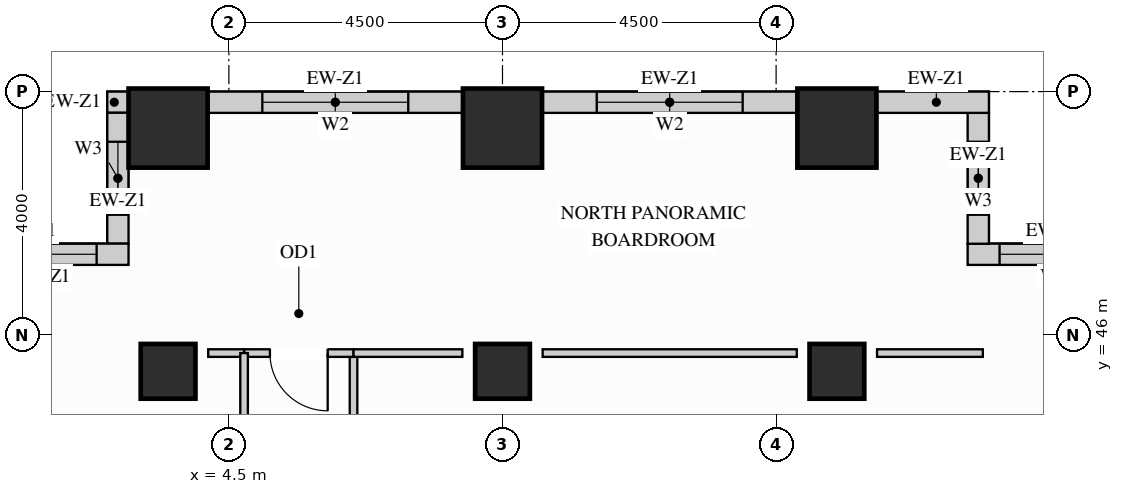
"""IFC4 building model, lengths in metres.
Left out: names, types, materials, properties, quantities, classifications, styles, units other than length and angle.
Written with IfcOpenShell. Run it as: python <this file> out.ifc"""

import sys

from ifc_helpers import new_model, si_unit, direction, frame, frame_2d, origin, origin_2d, place, context, subcontext, project, spatial, rectangle, extrude, source, transform, mapped, element, fill, save


model = new_model("IFC4")
c1 = context("Model", 3, precision=1e-05, world=origin(), true_north=direction((0.0, 1.0)))
c2 = subcontext(c1, "Body", "Model", "MODEL_VIEW")
j1 = project(units=[si_unit("LENGTHUNIT", "METRE"), si_unit("PLANEANGLEUNIT", "RADIAN")], contexts=[c1])
p1 = place(None, origin())
s1 = spatial("IfcSite", under=j1, at=p1, CompositionType="ELEMENT")
p2 = place(p1, origin())
s2 = spatial("IfcBuilding", under=s1, at=p2, CompositionType="ELEMENT")
p3 = place(p2, frame((0.0, 0.0, 44.1)))
s3 = spatial("IfcBuildingStorey", under=s2, at=p3, CompositionType="ELEMENT", Elevation=44.1)
m1 = source(origin(), c2, "Body", "SweptSolid", [
    extrude(rectangle(XDim=0.9, YDim=0.9, at=origin_2d()), origin(), (0.0, 0.0, 1.0), 3.38),
])
for number, where, z_axis, x_axis in (
    (1, (14.5, 45.4, 0.0), (0.0, 0.0, 1.0), (1.0, 0.0, 0.0)),
    (2, (3.5, 45.4, 0.0), (0.0, 0.0, 1.0), (1.0, 0.0, 0.0)),
    (3, (9.0, 45.4, 0.0), (0.0, 0.0, 1.0), (1.0, 0.0, 0.0)),
):
    element("IfcColumn", number, at=place(p3, frame(where, z_axis=z_axis, x_axis=x_axis)), inside=s3, PredefinedType="COLUMN", context=c2, shape_type="MappedRepresentation", body=[
        mapped(m1, transform((0.0, 0.0, 0.0), x_axis=(1.0, 0.0, 0.0), y_axis=(0.0, 1.0, 0.0), z_axis=(0.0, 0.0, 1.0))),
    ])
m2 = source(origin(), c2, "Body", "SweptSolid", [
    extrude(rectangle(XDim=1.3, YDim=1.3, at=origin_2d()), origin(), (0.0, 0.0, 1.0), 3.38),
])
for number, where, z_axis, x_axis in (
    (4, (14.5, 49.4, 0.0), (0.0, 0.0, 1.0), (1.0, 0.0, 0.0)),
    (5, (3.5, 49.4, 0.0), (0.0, 0.0, 1.0), (1.0, 0.0, 0.0)),
    (6, (9.0, 49.4, 0.0), (0.0, 0.0, 1.0), (1.0, 0.0, 0.0)),
):
    element("IfcColumn", number, at=place(p3, frame(where, z_axis=z_axis, x_axis=x_axis)), inside=s3, PredefinedType="COLUMN", context=c2, shape_type="MappedRepresentation", body=[
        mapped(m2, transform((0.0, 0.0, 0.0), x_axis=(1.0, 0.0, 0.0), y_axis=(0.0, 1.0, 0.0), z_axis=(0.0, 0.0, 1.0))),
    ])
p4 = place(p3, frame((19.5, 47.325, 0.0), z_axis=(0.0, 0.0, 1.0), x_axis=(-1.0, 0.0, 0.0)))
e7 = element("IfcWall", 7, at=p4, inside=s3, PredefinedType="SOLIDWALL", context=c2, shape_type="SweptSolid", body=[
    extrude(rectangle(XDim=2.85, YDim=0.35, at=frame_2d((1.425, 0.0))), origin(), (0.0, 0.0, 1.0), 3.365),
])
p5 = place(p4, frame((0.525, 0.0, 0.78)))
e8 = element("IfcOpeningElement", 8, at=p5, cuts=e7, PredefinedType="OPENING", context=c2, shape_type="SweptSolid", body=[
    extrude(rectangle(XDim=1.8, YDim=2.1, at=frame_2d((0.9, 1.05))), frame((0.0, 0.185, 0.0), z_axis=(0.0, -1.0, 0.0), x_axis=(1.0, 0.0, 0.0)), (0.0, 0.0, 1.0), 0.37),
])
p6 = place(p3, frame((16.825, 47.498, 0.0), z_axis=(0.0, 0.0, 1.0), x_axis=(0.0, 1.0, 0.0)))
e9 = element("IfcWall", 9, at=p6, inside=s3, PredefinedType="SOLIDWALL", context=c2, shape_type="SweptSolid", body=[
    extrude(rectangle(XDim=2.154, YDim=0.35, at=frame_2d((1.077, 0.0))), origin(), (0.0, 0.0, 1.0), 3.365),
])
p7 = place(p6, frame((0.477, 0.0, 0.78)))
e10 = element("IfcOpeningElement", 10, at=p7, cuts=e9, PredefinedType="OPENING", context=c2, shape_type="SweptSolid", body=[
    extrude(rectangle(XDim=1.2, YDim=2.1, at=frame_2d((0.6, 1.05))), frame((0.0, 0.185, 0.0), z_axis=(0.0, -1.0, 0.0), x_axis=(1.0, 0.0, 0.0)), (0.0, 0.0, 1.0), 0.37),
])
m3 = source(origin(), c2, "Body", "SweptSolid", [
    extrude(rectangle(XDim=1.852, YDim=0.35, at=frame_2d((0.926, 0.0))), origin(), (0.0, 0.0, 1.0), 3.365),
])
p8 = place(p3, frame((17.0, 49.825, 0.0), z_axis=(0.0, 0.0, 1.0), x_axis=(-1.0, 0.0, 0.0)))
e11 = element("IfcWall", 11, at=p8, inside=s3, PredefinedType="SOLIDWALL", context=c2, shape_type="MappedRepresentation", body=[
    mapped(m3, transform((0.0, 0.0, 0.0), x_axis=(1.0, 0.0, 0.0), y_axis=(0.0, 1.0, 0.0), z_axis=(0.0, 0.0, 1.0))),
])
p9 = place(p3, frame((13.852, 49.825, 0.0), z_axis=(0.0, 0.0, 1.0), x_axis=(-1.0, 0.0, 0.0)))
e12 = element("IfcWall", 12, at=p9, inside=s3, PredefinedType="SOLIDWALL", context=c2, shape_type="SweptSolid", body=[
    extrude(rectangle(XDim=4.204, YDim=0.35, at=frame_2d((2.102, 0.0))), origin(), (0.0, 0.0, 1.0), 2.51),
])
p10 = place(p9, frame((0.902, 0.0, 0.78)))
e13 = element("IfcOpeningElement", 13, at=p10, cuts=e12, PredefinedType="OPENING", context=c2, shape_type="SweptSolid", body=[
    extrude(rectangle(XDim=2.4, YDim=1.55, at=frame_2d((1.2, 0.775))), frame((0.0, 0.185, 0.0), z_axis=(0.0, -1.0, 0.0), x_axis=(1.0, 0.0, 0.0)), (0.0, 0.0, 1.0), 0.37),
])
p11 = place(p3, frame((8.352, 49.825, 0.0), z_axis=(0.0, 0.0, 1.0), x_axis=(-1.0, 0.0, 0.0)))
e14 = element("IfcWall", 14, at=p11, inside=s3, PredefinedType="SOLIDWALL", context=c2, shape_type="SweptSolid", body=[
    extrude(rectangle(XDim=4.204, YDim=0.35, at=frame_2d((2.102, 0.0))), origin(), (0.0, 0.0, 1.0), 2.51),
])
p12 = place(p11, frame((0.902, 0.0, 0.78)))
e15 = element("IfcOpeningElement", 15, at=p12, cuts=e14, PredefinedType="OPENING", context=c2, shape_type="SweptSolid", body=[
    extrude(rectangle(XDim=2.4, YDim=1.55, at=frame_2d((1.2, 0.775))), frame((0.0, 0.185, 0.0), z_axis=(0.0, -1.0, 0.0), x_axis=(1.0, 0.0, 0.0)), (0.0, 0.0, 1.0), 0.37),
])
m4 = source(origin(), c2, "Body", "SweptSolid", [
    extrude(rectangle(XDim=0.352, YDim=0.35, at=frame_2d((0.176, 0.0))), origin(), (0.0, 0.0, 1.0), 3.365),
])
p13 = place(p3, frame((2.852, 49.825, 0.0), z_axis=(0.0, 0.0, 1.0), x_axis=(-1.0, 0.0, 0.0)))
e16 = element("IfcWall", 16, at=p13, inside=s3, PredefinedType="SOLIDWALL", context=c2, shape_type="MappedRepresentation", body=[
    mapped(m4, transform((0.0, 0.0, 0.0), x_axis=(1.0, 0.0, 0.0), y_axis=(0.0, 1.0, 0.0), z_axis=(0.0, 0.0, 1.0))),
])
p14 = place(p3, frame((2.675, 49.652, 0.0), z_axis=(0.0, 0.0, 1.0), x_axis=(0.0, -1.0, 0.0)))
e17 = element("IfcWall", 17, at=p14, inside=s3, PredefinedType="SOLIDWALL", context=c2, shape_type="SweptSolid", body=[
    extrude(rectangle(XDim=2.154, YDim=0.35, at=frame_2d((1.077, 0.0))), origin(), (0.0, 0.0, 1.0), 3.365),
])
p15 = place(p14, frame((0.477, 0.0, 0.78)))
e18 = element("IfcOpeningElement", 18, at=p15, cuts=e17, PredefinedType="OPENING", context=c2, shape_type="SweptSolid", body=[
    extrude(rectangle(XDim=1.2, YDim=2.1, at=frame_2d((0.6, 1.05))), frame((0.0, 0.185, 0.0), z_axis=(0.0, -1.0, 0.0), x_axis=(1.0, 0.0, 0.0)), (0.0, 0.0, 1.0), 0.37),
])
p16 = place(p3, frame((2.85, 47.325, 0.0), z_axis=(0.0, 0.0, 1.0), x_axis=(-1.0, 0.0, 0.0)))
e19 = element("IfcWall", 19, at=p16, inside=s3, PredefinedType="SOLIDWALL", context=c2, shape_type="SweptSolid", body=[
    extrude(rectangle(XDim=2.85, YDim=0.35, at=frame_2d((1.425, 0.0))), origin(), (0.0, 0.0, 1.0), 3.365),
])
p17 = place(p16, frame((0.525, 0.0, 0.78)))
e20 = element("IfcOpeningElement", 20, at=p17, cuts=e19, PredefinedType="OPENING", context=c2, shape_type="SweptSolid", body=[
    extrude(rectangle(XDim=1.8, YDim=2.1, at=frame_2d((0.9, 1.05))), frame((0.0, 0.185, 0.0), z_axis=(0.0, -1.0, 0.0), x_axis=(1.0, 0.0, 0.0)), (0.0, 0.0, 1.0), 0.37),
])
p18 = place(p3, frame((6.55, 41.344, 0.0), z_axis=(0.0, 0.0, 1.0), x_axis=(0.0, 1.0, 0.0)))
e21 = element("IfcWall", 21, at=p18, inside=s3, PredefinedType="PARTITIONING", context=c2, shape_type="SweptSolid", body=[
    extrude(rectangle(XDim=4.356, YDim=0.125, at=frame_2d((2.178, 0.0))), origin(), (0.0, 0.0, 1.0), 3.365),
])
p19 = place(p18, frame((1.703, 0.0, 0.0)))
e22 = element("IfcOpeningElement", 22, at=p19, cuts=e21, PredefinedType="OPENING", context=c2, shape_type="SweptSolid", body=[
    extrude(rectangle(XDim=0.95, YDim=2.15, at=frame_2d((0.475, 1.075))), frame((0.0, 0.073, 0.0), z_axis=(0.0, -1.0, 0.0), x_axis=(1.0, 0.0, 0.0)), (0.0, 0.0, 1.0), 0.145),
])
p20 = place(p3, frame((4.75, 45.7, 0.0), z_axis=(0.0, 0.0, 1.0), x_axis=(1.0, 0.0, 0.0)))
e23 = element("IfcWall", 23, at=p20, inside=s3, PredefinedType="PARTITIONING", context=c2, shape_type="SweptSolid", body=[
    extrude(rectangle(XDim=1.8, YDim=0.125, at=frame_2d((0.9, 0.0))), origin(), (0.0, 0.0, 1.0), 2.67),
])
p21 = place(p20, frame((0.425, 0.0, 0.0)))
e24 = element("IfcOpeningElement", 24, at=p21, cuts=e23, PredefinedType="OPENING", context=c2, shape_type="SweptSolid", body=[
    extrude(rectangle(XDim=0.95, YDim=2.15, at=frame_2d((0.475, 1.075))), frame((0.0, 0.073, 0.0), z_axis=(0.0, -1.0, 0.0), x_axis=(1.0, 0.0, 0.0)), (0.0, 0.0, 1.0), 0.145),
])
m5 = source(origin(), c2, "Body", "SweptSolid", [
    extrude(rectangle(XDim=1.79, YDim=0.125, at=frame_2d((0.895, 0.0))), origin(), (0.0, 0.0, 1.0), 2.67),
])
p22 = place(p3, frame((6.55, 45.7, 0.0), z_axis=(0.0, 0.0, 1.0), x_axis=(1.0, 0.0, 0.0)))
e25 = element("IfcWall", 25, at=p22, inside=s3, PredefinedType="PARTITIONING", context=c2, shape_type="MappedRepresentation", body=[
    mapped(m5, transform((0.0, 0.0, 0.0), x_axis=(1.0, 0.0, 0.0), y_axis=(0.0, 1.0, 0.0), z_axis=(0.0, 0.0, 1.0))),
])
m6 = source(origin(), c2, "Body", "SweptSolid", [
    extrude(rectangle(XDim=4.18, YDim=0.125, at=frame_2d((2.09, 0.0))), origin(), (0.0, 0.0, 1.0), 2.67),
])
p23 = place(p3, frame((9.66, 45.7, 0.0), z_axis=(0.0, 0.0, 1.0), x_axis=(1.0, 0.0, 0.0)))
e26 = element("IfcWall", 26, at=p23, inside=s3, PredefinedType="PARTITIONING", context=c2, shape_type="MappedRepresentation", body=[
    mapped(m6, transform((0.0, 0.0, 0.0), x_axis=(1.0, 0.0, 0.0), y_axis=(0.0, 1.0, 0.0), z_axis=(0.0, 0.0, 1.0))),
])
m7 = source(origin(), c2, "Body", "SweptSolid", [
    extrude(rectangle(XDim=1.74, YDim=0.125, at=frame_2d((0.87, 0.0))), origin(), (0.0, 0.0, 1.0), 2.67),
])
p24 = place(p3, frame((15.16, 45.7, 0.0), z_axis=(0.0, 0.0, 1.0), x_axis=(1.0, 0.0, 0.0)))
e27 = element("IfcWall", 27, at=p24, inside=s3, PredefinedType="PARTITIONING", context=c2, shape_type="MappedRepresentation", body=[
    mapped(m7, transform((0.0, 0.0, 0.0), x_axis=(1.0, 0.0, 0.0), y_axis=(0.0, 1.0, 0.0), z_axis=(0.0, 0.0, 1.0))),
])
m8 = source(origin(), c2, "Body", "SweptSolid", [
    extrude(rectangle(XDim=0.59, YDim=0.125, at=frame_2d((0.295, 0.0))), origin(), (0.0, 0.0, 1.0), 2.67),
])
p25 = place(p3, frame((4.16, 45.7, 0.0), z_axis=(0.0, 0.0, 1.0), x_axis=(1.0, 0.0, 0.0)))
e28 = element("IfcWall", 28, at=p25, inside=s3, PredefinedType="PARTITIONING", context=c2, shape_type="MappedRepresentation", body=[
    mapped(m8, transform((0.0, 0.0, 0.0), x_axis=(1.0, 0.0, 0.0), y_axis=(0.0, 1.0, 0.0), z_axis=(0.0, 0.0, 1.0))),
])
p26 = place(p3, frame((4.75, 38.394, 0.0), z_axis=(0.0, 0.0, 1.0), x_axis=(0.0, 1.0, 0.0)))
e29 = element("IfcWall", 29, at=p26, inside=s3, PredefinedType="PARTITIONING", context=c2, shape_type="SweptSolid", body=[
    extrude(rectangle(XDim=7.306, YDim=0.125, at=frame_2d((3.653, 0.0))), origin(), (0.0, 0.0, 1.0), 3.365),
])
p27 = place(p26, frame((4.108, 0.0, 0.0)))
e30 = element("IfcOpeningElement", 30, at=p27, cuts=e29, PredefinedType="OPENING", context=c2, shape_type="SweptSolid", body=[
    extrude(rectangle(XDim=0.95, YDim=2.15, at=frame_2d((0.475, 1.075))), frame((0.0, 0.073, 0.0), z_axis=(0.0, -1.0, 0.0), x_axis=(1.0, 0.0, 0.0)), (0.0, 0.0, 1.0), 0.145),
])
m9 = source(origin(), c2, "Body", "SweptSolid", [
    extrude(rectangle(XDim=0.95, YDim=2.15, at=frame_2d((0.475, 1.075))), frame((0.0, 0.025, 0.0), z_axis=(0.0, -1.0, 0.0), x_axis=(1.0, 0.0, 0.0)), (0.0, 0.0, 1.0), 0.05),
])
p28 = place(p21, origin())
e31 = element("IfcDoor", 31, at=p28, inside=s3, OperationType="SINGLE_SWING_RIGHT", PredefinedType="DOOR", context=c2, shape_type="MappedRepresentation", body=[
    mapped(m9, transform((0.0, 0.0, 0.0), x_axis=(1.0, 0.0, 0.0), y_axis=(0.0, 1.0, 0.0), z_axis=(0.0, 0.0, 1.0))),
])
fill(e24, e31)
m10 = source(origin(), c2, "Body", "SweptSolid", [
    extrude(rectangle(XDim=1.8, YDim=2.1, at=frame_2d((0.9, 1.05))), frame((0.0, 0.03, 0.0), z_axis=(0.0, -1.0, 0.0), x_axis=(1.0, 0.0, 0.0)), (0.0, 0.0, 1.0), 0.06),
])
p29 = place(p5, origin())
e32 = element("IfcWindow", 32, at=p29, inside=s3, PartitioningType="SINGLE_PANEL", PredefinedType="WINDOW", context=c2, shape_type="MappedRepresentation", body=[
    mapped(m10, transform((0.0, 0.0, 0.0), x_axis=(1.0, 0.0, 0.0), y_axis=(0.0, 1.0, 0.0), z_axis=(0.0, 0.0, 1.0))),
])
fill(e8, e32)
p30 = place(p17, origin())
e33 = element("IfcWindow", 33, at=p30, inside=s3, PartitioningType="SINGLE_PANEL", PredefinedType="WINDOW", context=c2, shape_type="MappedRepresentation", body=[
    mapped(m10, transform((0.0, 0.0, 0.0), x_axis=(1.0, 0.0, 0.0), y_axis=(0.0, 1.0, 0.0), z_axis=(0.0, 0.0, 1.0))),
])
fill(e20, e33)
m11 = source(origin(), c2, "Body", "SweptSolid", [
    extrude(rectangle(XDim=2.4, YDim=1.55, at=frame_2d((1.2, 0.775))), frame((0.0, 0.03, 0.0), z_axis=(0.0, -1.0, 0.0), x_axis=(1.0, 0.0, 0.0)), (0.0, 0.0, 1.0), 0.06),
])
p31 = place(p10, origin())
e34 = element("IfcWindow", 34, at=p31, inside=s3, PartitioningType="SINGLE_PANEL", PredefinedType="WINDOW", context=c2, shape_type="MappedRepresentation", body=[
    mapped(m11, transform((0.0, 0.0, 0.0), x_axis=(1.0, 0.0, 0.0), y_axis=(0.0, 1.0, 0.0), z_axis=(0.0, 0.0, 1.0))),
])
fill(e13, e34)
p32 = place(p12, origin())
e35 = element("IfcWindow", 35, at=p32, inside=s3, PartitioningType="SINGLE_PANEL", PredefinedType="WINDOW", context=c2, shape_type="MappedRepresentation", body=[
    mapped(m11, transform((0.0, 0.0, 0.0), x_axis=(1.0, 0.0, 0.0), y_axis=(0.0, 1.0, 0.0), z_axis=(0.0, 0.0, 1.0))),
])
fill(e15, e35)
m12 = source(origin(), c2, "Body", "SweptSolid", [
    extrude(rectangle(XDim=1.2, YDim=2.1, at=frame_2d((0.6, 1.05))), frame((0.0, 0.03, 0.0), z_axis=(0.0, -1.0, 0.0), x_axis=(1.0, 0.0, 0.0)), (0.0, 0.0, 1.0), 0.06),
])
p33 = place(p7, origin())
e36 = element("IfcWindow", 36, at=p33, inside=s3, PartitioningType="SINGLE_PANEL", PredefinedType="WINDOW", context=c2, shape_type="MappedRepresentation", body=[
    mapped(m12, transform((0.0, 0.0, 0.0), x_axis=(1.0, 0.0, 0.0), y_axis=(0.0, 1.0, 0.0), z_axis=(0.0, 0.0, 1.0))),
])
fill(e10, e36)
p34 = place(p15, origin())
e37 = element("IfcWindow", 37, at=p34, inside=s3, PartitioningType="SINGLE_PANEL", PredefinedType="WINDOW", context=c2, shape_type="MappedRepresentation", body=[
    mapped(m12, transform((0.0, 0.0, 0.0), x_axis=(1.0, 0.0, 0.0), y_axis=(0.0, 1.0, 0.0), z_axis=(0.0, 0.0, 1.0))),
])
fill(e18, e37)
save(model, sys.argv[1])
